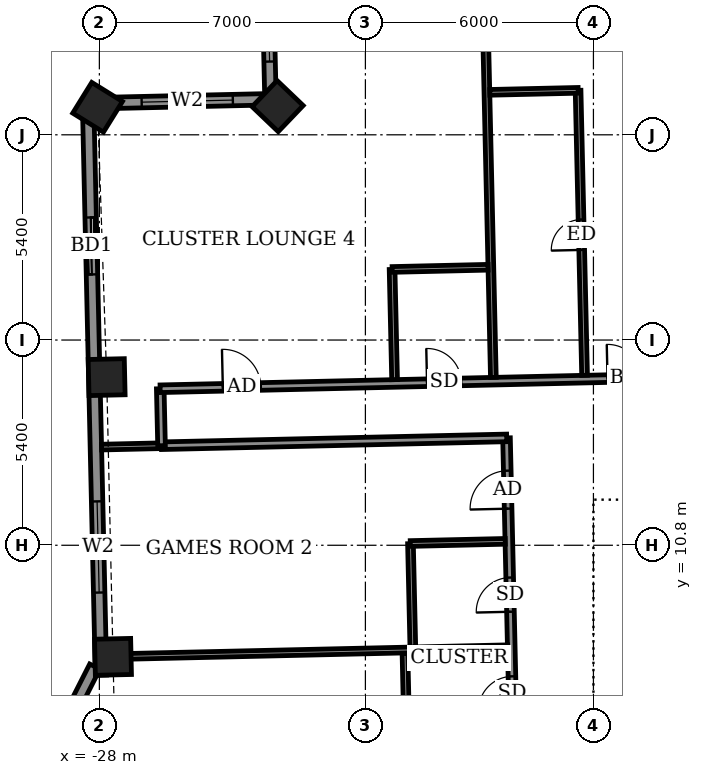
"""IFC4 building model, lengths in metres.
Left out: names, types, materials, properties, quantities, classifications, styles, units other than length and angle.
Written with IfcOpenShell. Run it as: python <this file> out.ifc"""

import sys

from ifc_helpers import new_model, si_unit, direction, frame, frame_2d, origin, origin_2d, place, context, subcontext, project, spatial, rectangle, extrude, element, fill, save


model = new_model("IFC4")
c1 = context("Model", 3, precision=1e-05, world=origin(), true_north=direction((0.0, 1.0)))
c2 = subcontext(c1, "Body", "Model", "MODEL_VIEW")
j1 = project(units=[si_unit("LENGTHUNIT", "METRE"), si_unit("PLANEANGLEUNIT", "RADIAN")], contexts=[c1])
p1 = place(None, origin())
s1 = spatial("IfcSite", under=j1, at=p1, CompositionType="ELEMENT")
p2 = place(p1, origin())
s2 = spatial("IfcBuilding", under=s1, at=p2, CompositionType="ELEMENT")
p3 = place(p2, frame((0.0, 0.0, 279.9)))
s3 = spatial("IfcBuildingStorey", under=s2, at=p3, CompositionType="ELEMENT", Elevation=279.9)
for number, where, z_axis, x_axis in (
    (1, (-23.309, 22.355, -0.55), (0.0, 0.0, 1.0), (-0.691, -0.723, 0.0)),
    (2, (-28.046, 22.324, -0.55), (0.0, 0.0, 1.0), (-0.527, -0.85, 0.0)),
    (3, (-27.808, 15.224, -0.55), (0.0, 0.0, 1.0), (0.023, -1.0, 0.0)),
    (4, (-27.641, 7.864, -0.55), (0.0, 0.0, 1.0), (0.023, -1.0, 0.0)),
):
    element("IfcColumn", number, at=place(p3, frame(where, z_axis=z_axis, x_axis=x_axis)), inside=s3, PredefinedType="COLUMN", context=c2, shape_type="SweptSolid", body=[
        extrude(rectangle(XDim=0.95, YDim=0.95, at=origin_2d()), origin(), (0.0, 0.0, 1.0), 3.6),
    ])
p4 = place(p3, frame((-23.607, 27.335, 0.0), z_axis=(0.0, 0.0, 1.0), x_axis=(0.022683280499, -0.999742701292, 0.0)))
e5 = element("IfcWall", 5, at=p4, inside=s3, PredefinedType="SOLIDWALL", context=c2, shape_type="SweptSolid", body=[
    extrude(rectangle(XDim=4.8, YDim=0.3, at=frame_2d((2.4, 0.0))), origin(), (0.0, 0.0, 1.0), 2.55),
])
p5 = place(p4, frame((1.409, 0.0, 0.9)))
e6 = element("IfcOpeningElement", 6, at=p5, cuts=e5, PredefinedType="OPENING", context=c2, shape_type="SweptSolid", body=[
    extrude(rectangle(XDim=2.4, YDim=1.5, at=frame_2d((1.2, 0.75))), frame((0.0, 0.16, 0.0), z_axis=(0.0, -1.0, 0.0), x_axis=(1.0, 0.0, 0.0)), (0.0, 0.0, 1.0), 0.32),
])
p6 = place(p3, frame((-23.498, 22.536, 0.0), z_axis=(0.0, 0.0, 1.0), x_axis=(-0.999742701292, -0.022683280499, 0.0)))
e7 = element("IfcWall", 7, at=p6, inside=s3, PredefinedType="SOLIDWALL", context=c2, shape_type="SweptSolid", body=[
    extrude(rectangle(XDim=4.8, YDim=0.3, at=frame_2d((2.4, 0.0))), origin(), (0.0, 0.0, 1.0), 2.55),
])
p7 = place(p6, frame((0.99, 0.0, 0.9)))
e8 = element("IfcOpeningElement", 8, at=p7, cuts=e7, PredefinedType="OPENING", context=c2, shape_type="SweptSolid", body=[
    extrude(rectangle(XDim=2.4, YDim=1.5, at=frame_2d((1.2, 0.75))), frame((0.0, 0.16, 0.0), z_axis=(0.0, -1.0, 0.0), x_axis=(1.0, 0.0, 0.0)), (0.0, 0.0, 1.0), 0.32),
])
p8 = place(p3, frame((-28.297, 22.427, 0.0), z_axis=(0.0, 0.0, 1.0), x_axis=(0.022663916124, -0.999743140465, 0.0)))
e9 = element("IfcWall", 9, at=p8, inside=s3, PredefinedType="SOLIDWALL", context=c2, shape_type="SweptSolid", body=[
    extrude(rectangle(XDim=15.049, YDim=0.3, at=frame_2d((7.524, 0.0))), origin(), (0.0, 0.0, 1.0), 2.5),
])
p9 = place(p8, frame((3.002, 0.0, 0.0)))
e10 = element("IfcOpeningElement", 10, at=p9, cuts=e9, PredefinedType="OPENING", context=c2, shape_type="SweptSolid", body=[
    extrude(rectangle(XDim=1.5, YDim=2.4, at=frame_2d((0.75, 1.2))), frame((0.0, 0.16, 0.0), z_axis=(0.0, -1.0, 0.0), x_axis=(1.0, 0.0, 0.0)), (0.0, 0.0, 1.0), 0.32),
])
p10 = place(p8, frame((10.475, 0.0, 0.9)))
e11 = element("IfcOpeningElement", 11, at=p10, cuts=e9, PredefinedType="OPENING", context=c2, shape_type="SweptSolid", body=[
    extrude(rectangle(XDim=2.4, YDim=1.5, at=frame_2d((1.2, 0.75))), frame((0.0, 0.16, 0.0), z_axis=(0.0, -1.0, 0.0), x_axis=(1.0, 0.0, 0.0)), (0.0, 0.0, 1.0), 0.32),
])
p11 = place(p3, frame((-28.12, 7.608, 0.0), z_axis=(0.0, 0.0, 1.0), x_axis=(-0.45266802131, -0.891679125293, 0.0)))
e12 = element("IfcWall", 12, at=p11, inside=s3, PredefinedType="SOLIDWALL", context=c2, shape_type="SweptSolid", body=[
    extrude(rectangle(XDim=5.399, YDim=0.3, at=frame_2d((2.699, 0.0))), origin(), (0.0, 0.0, 1.0), 3.05),
])
p12 = place(p11, frame((2.008, 0.0, 0.9)))
e13 = element("IfcOpeningElement", 13, at=p12, cuts=e12, PredefinedType="OPENING", context=c2, shape_type="SweptSolid", body=[
    extrude(rectangle(XDim=1.2, YDim=1.5, at=frame_2d((0.6, 0.75))), frame((0.0, 0.16, 0.0), z_axis=(0.0, -1.0, 0.0), x_axis=(1.0, 0.0, 0.0)), (0.0, 0.0, 1.0), 0.32),
])
p13 = place(p3, frame((-16.684, -12.919, 0.0), z_axis=(0.0, 0.0, 1.0), x_axis=(-0.022712214871, 0.999742044377, 0.0)))
e14 = element("IfcWall", 14, at=p13, inside=s3, PredefinedType="PARTITIONING", context=c2, shape_type="SweptSolid", body=[
    extrude(rectangle(XDim=26.551, YDim=0.2, at=frame_2d((13.275, 0.0))), origin(), (0.0, 0.0, 1.0), 3.05),
])
p14 = place(p13, frame((24.688, 0.0, 0.0)))
e15 = element("IfcOpeningElement", 15, at=p14, cuts=e14, PredefinedType="OPENING", context=c2, shape_type="SweptSolid", body=[
    extrude(rectangle(XDim=1.0, YDim=2.1, at=frame_2d((0.5, 1.05))), frame((0.0, 0.11, 0.0), z_axis=(0.0, -1.0, 0.0), x_axis=(1.0, 0.0, 0.0)), (0.0, 0.0, 1.0), 0.22),
])
p15 = place(p13, frame((21.975, 0.0, 0.0)))
e16 = element("IfcOpeningElement", 16, at=p15, cuts=e14, PredefinedType="OPENING", context=c2, shape_type="SweptSolid", body=[
    extrude(rectangle(XDim=0.9, YDim=2.1, at=frame_2d((0.45, 1.05))), frame((0.0, 0.11, 0.0), z_axis=(0.0, -1.0, 0.0), x_axis=(1.0, 0.0, 0.0)), (0.0, 0.0, 1.0), 0.22),
])
p16 = place(p13, frame((16.875, 0.0, 0.0)))
e17 = element("IfcOpeningElement", 17, at=p16, cuts=e14, PredefinedType="OPENING", context=c2, shape_type="SweptSolid", body=[
    extrude(rectangle(XDim=1.0, YDim=2.1, at=frame_2d((0.5, 1.05))), frame((0.0, 0.11, 0.0), z_axis=(0.0, -1.0, 0.0), x_axis=(1.0, 0.0, 0.0)), (0.0, 0.0, 1.0), 0.22),
])
p17 = place(p13, frame((19.375, 0.0, 0.0)))
e18 = element("IfcOpeningElement", 18, at=p17, cuts=e14, PredefinedType="OPENING", context=c2, shape_type="SweptSolid", body=[
    extrude(rectangle(XDim=0.9, YDim=2.1, at=frame_2d((0.45, 1.05))), frame((0.0, 0.11, 0.0), z_axis=(0.0, -1.0, 0.0), x_axis=(1.0, 0.0, 0.0)), (0.0, 0.0, 1.0), 0.22),
])
p18 = place(p13, frame((14.05, 0.0, 0.0)))
e19 = element("IfcOpeningElement", 19, at=p18, cuts=e14, PredefinedType="OPENING", context=c2, shape_type="SweptSolid", body=[
    extrude(rectangle(XDim=1.0, YDim=2.1, at=frame_2d((0.5, 1.05))), frame((0.0, 0.11, 0.0), z_axis=(0.0, -1.0, 0.0), x_axis=(1.0, 0.0, 0.0)), (0.0, 0.0, 1.0), 0.22),
])
p19 = place(p13, frame((11.225, 0.0, 0.0)))
e20 = element("IfcOpeningElement", 20, at=p19, cuts=e14, PredefinedType="OPENING", context=c2, shape_type="SweptSolid", body=[
    extrude(rectangle(XDim=0.9, YDim=2.1, at=frame_2d((0.45, 1.05))), frame((0.0, 0.11, 0.0), z_axis=(0.0, -1.0, 0.0), x_axis=(1.0, 0.0, 0.0)), (0.0, 0.0, 1.0), 0.22),
])
p20 = place(p13, frame((8.37, 0.0, 0.0)))
e21 = element("IfcOpeningElement", 21, at=p20, cuts=e14, PredefinedType="OPENING", context=c2, shape_type="SweptSolid", body=[
    extrude(rectangle(XDim=1.0, YDim=2.1, at=frame_2d((0.5, 1.05))), frame((0.0, 0.11, 0.0), z_axis=(0.0, -1.0, 0.0), x_axis=(1.0, 0.0, 0.0)), (0.0, 0.0, 1.0), 0.22),
])
p21 = place(p13, frame((5.263, 0.0, 0.0)))
e22 = element("IfcOpeningElement", 22, at=p21, cuts=e14, PredefinedType="OPENING", context=c2, shape_type="SweptSolid", body=[
    extrude(rectangle(XDim=1.0, YDim=2.1, at=frame_2d((0.5, 1.05))), frame((0.0, 0.11, 0.0), z_axis=(0.0, -1.0, 0.0), x_axis=(1.0, 0.0, 0.0)), (0.0, 0.0, 1.0), 0.22),
])
p22 = place(p13, frame((0.425, 0.0, 0.0)))
e23 = element("IfcOpeningElement", 23, at=p22, cuts=e14, PredefinedType="OPENING", context=c2, shape_type="SweptSolid", body=[
    extrude(rectangle(XDim=1.0, YDim=2.1, at=frame_2d((0.5, 1.05))), frame((0.0, 0.11, 0.0), z_axis=(0.0, -1.0, 0.0), x_axis=(1.0, 0.0, 0.0)), (0.0, 0.0, 1.0), 0.22),
])
p23 = place(p13, frame((2.6, 0.0, 0.0)))
e24 = element("IfcOpeningElement", 24, at=p23, cuts=e14, PredefinedType="OPENING", context=c2, shape_type="SweptSolid", body=[
    extrude(rectangle(XDim=0.9, YDim=2.1, at=frame_2d((0.45, 1.05))), frame((0.0, 0.11, 0.0), z_axis=(0.0, -1.0, 0.0), x_axis=(1.0, 0.0, 0.0)), (0.0, 0.0, 1.0), 0.22),
])
p24 = place(p3, frame((-19.906, 5.638, 0.0), z_axis=(0.0, 0.0, 1.0), x_axis=(-0.022781023197, 0.999740478815, 0.0)))
e25 = element("IfcWall", 25, at=p24, inside=s3, PredefinedType="PARTITIONING", context=c2, shape_type="SweptSolid", body=[
    extrude(rectangle(XDim=2.325, YDim=0.15, at=frame_2d((1.163, 0.0))), origin(), (0.0, 0.0, 1.0), 3.05),
])
p25 = place(p3, frame((-19.752, 8.117, 0.0), z_axis=(0.0, 0.0, 1.0), x_axis=(-0.022749889061, 0.999741187782, 0.0)))
e26 = element("IfcWall", 26, at=p25, inside=s3, PredefinedType="PARTITIONING", context=c2, shape_type="SweptSolid", body=[
    extrude(rectangle(XDim=2.726, YDim=0.15, at=frame_2d((1.363, 0.0))), origin(), (0.0, 0.0, 1.0), 3.05),
])
p26 = place(p3, frame((-27.817, 7.864, 0.0), z_axis=(0.0, 0.0, 1.0), x_axis=(0.9997418952, 0.022718780382, 0.0)))
e27 = element("IfcWall", 27, at=p26, inside=s3, PredefinedType="PARTITIONING", context=c2, shape_type="SweptSolid", body=[
    extrude(rectangle(XDim=10.563, YDim=0.15, at=frame_2d((5.282, 0.0))), origin(), (0.0, 0.0, 1.0), 3.05),
])
p27 = place(p3, frame((-19.819, 10.846, 0.0), z_axis=(0.0, 0.0, 1.0), x_axis=(0.999738801317, 0.022854521249, 0.0)))
e28 = element("IfcWall", 28, at=p27, inside=s3, PredefinedType="PARTITIONING", context=c2, shape_type="SweptSolid", body=[
    extrude(rectangle(XDim=2.5, YDim=0.15, at=frame_2d((1.25, 0.0))), origin(), (0.0, 0.0, 1.0), 3.05),
])
p28 = place(p3, frame((-27.942, 13.383, 0.0), z_axis=(0.0, 0.0, 1.0), x_axis=(0.999741755729, 0.022724916977, 0.0)))
e29 = element("IfcWall", 29, at=p28, inside=s3, PredefinedType="PARTITIONING", context=c2, shape_type="SweptSolid", body=[
    extrude(rectangle(XDim=1.579, YDim=0.15, at=frame_2d((0.79, 0.0))), origin(), (0.0, 0.0, 1.0), 2.5),
])
p29 = place(p3, frame((-26.367, 13.419, 0.0), z_axis=(0.0, 0.0, 1.0), x_axis=(0.999742888587, 0.022675024131, 0.0)))
e30 = element("IfcWall", 30, at=p29, inside=s3, PredefinedType="PARTITIONING", context=c2, shape_type="SweptSolid", body=[
    extrude(rectangle(XDim=9.087, YDim=0.2, at=frame_2d((4.544, 0.0))), origin(), (0.0, 0.0, 1.0), 3.05),
])
p30 = place(p3, frame((-26.364, 13.419, 0.0), z_axis=(0.0, 0.0, 1.0), x_axis=(-0.022632637625, 0.99974384905, 0.0)))
e31 = element("IfcWall", 31, at=p30, inside=s3, PredefinedType="PARTITIONING", context=c2, shape_type="SweptSolid", body=[
    extrude(rectangle(XDim=1.5, YDim=0.2, at=frame_2d((0.75, 0.0))), origin(), (0.0, 0.0, 1.0), 3.05),
])
p31 = place(p3, frame((-26.401, 14.918, 0.0), z_axis=(0.0, 0.0, 1.0), x_axis=(0.99974239733, 0.022696673341, 0.0)))
e32 = element("IfcWall", 32, at=p31, inside=s3, PredefinedType="PARTITIONING", context=c2, shape_type="SweptSolid", body=[
    extrude(rectangle(XDim=55.386, YDim=0.2, at=frame_2d((27.693, 0.0))), origin(), (0.0, 0.0, 1.0), 3.05),
])
p32 = place(p31, frame((52.889, 0.0, 0.0)))
e33 = element("IfcOpeningElement", 33, at=p32, cuts=e32, PredefinedType="OPENING", context=c2, shape_type="SweptSolid", body=[
    extrude(rectangle(XDim=1.0, YDim=2.1, at=frame_2d((0.5, 1.05))), frame((0.0, 0.11, 0.0), z_axis=(0.0, -1.0, 0.0), x_axis=(1.0, 0.0, 0.0)), (0.0, 0.0, 1.0), 0.22),
])
p33 = place(p31, frame((48.6, 0.0, 0.0)))
e34 = element("IfcOpeningElement", 34, at=p33, cuts=e32, PredefinedType="OPENING", context=c2, shape_type="SweptSolid", body=[
    extrude(rectangle(XDim=0.9, YDim=2.1, at=frame_2d((0.45, 1.05))), frame((0.0, 0.11, 0.0), z_axis=(0.0, -1.0, 0.0), x_axis=(1.0, 0.0, 0.0)), (0.0, 0.0, 1.0), 0.22),
])
p34 = place(p31, frame((41.8, 0.0, 0.0)))
e35 = element("IfcOpeningElement", 35, at=p34, cuts=e32, PredefinedType="OPENING", context=c2, shape_type="SweptSolid", body=[
    extrude(rectangle(XDim=0.9, YDim=2.1, at=frame_2d((0.45, 1.05))), frame((0.0, 0.11, 0.0), z_axis=(0.0, -1.0, 0.0), x_axis=(1.0, 0.0, 0.0)), (0.0, 0.0, 1.0), 0.22),
])
p35 = place(p31, frame((39.675, 0.0, 0.0)))
e36 = element("IfcOpeningElement", 36, at=p35, cuts=e32, PredefinedType="OPENING", context=c2, shape_type="SweptSolid", body=[
    extrude(rectangle(XDim=0.9, YDim=2.1, at=frame_2d((0.45, 1.05))), frame((0.0, 0.11, 0.0), z_axis=(0.0, -1.0, 0.0), x_axis=(1.0, 0.0, 0.0)), (0.0, 0.0, 1.0), 0.22),
])
p36 = place(p31, frame((32.675, 0.0, 0.0)))
e37 = element("IfcOpeningElement", 37, at=p36, cuts=e32, PredefinedType="OPENING", context=c2, shape_type="SweptSolid", body=[
    extrude(rectangle(XDim=0.9, YDim=2.1, at=frame_2d((0.45, 1.05))), frame((0.0, 0.11, 0.0), z_axis=(0.0, -1.0, 0.0), x_axis=(1.0, 0.0, 0.0)), (0.0, 0.0, 1.0), 0.22),
])
p37 = place(p31, frame((30.4, 0.0, 0.0)))
e38 = element("IfcOpeningElement", 38, at=p37, cuts=e32, PredefinedType="OPENING", context=c2, shape_type="SweptSolid", body=[
    extrude(rectangle(XDim=0.9, YDim=2.1, at=frame_2d((0.45, 1.05))), frame((0.0, 0.11, 0.0), z_axis=(0.0, -1.0, 0.0), x_axis=(1.0, 0.0, 0.0)), (0.0, 0.0, 1.0), 0.22),
])
p38 = place(p31, frame((23.225, 0.0, 0.0)))
e39 = element("IfcOpeningElement", 39, at=p38, cuts=e32, PredefinedType="OPENING", context=c2, shape_type="SweptSolid", body=[
    extrude(rectangle(XDim=0.9, YDim=2.1, at=frame_2d((0.45, 1.05))), frame((0.0, 0.11, 0.0), z_axis=(0.0, -1.0, 0.0), x_axis=(1.0, 0.0, 0.0)), (0.0, 0.0, 1.0), 0.22),
])
p39 = place(p31, frame((20.9, 0.0, 0.0)))
e40 = element("IfcOpeningElement", 40, at=p39, cuts=e32, PredefinedType="OPENING", context=c2, shape_type="SweptSolid", body=[
    extrude(rectangle(XDim=0.9, YDim=2.1, at=frame_2d((0.45, 1.05))), frame((0.0, 0.11, 0.0), z_axis=(0.0, -1.0, 0.0), x_axis=(1.0, 0.0, 0.0)), (0.0, 0.0, 1.0), 0.22),
])
p40 = place(p31, frame((13.9, 0.0, 0.0)))
e41 = element("IfcOpeningElement", 41, at=p40, cuts=e32, PredefinedType="OPENING", context=c2, shape_type="SweptSolid", body=[
    extrude(rectangle(XDim=0.9, YDim=2.1, at=frame_2d((0.45, 1.05))), frame((0.0, 0.11, 0.0), z_axis=(0.0, -1.0, 0.0), x_axis=(1.0, 0.0, 0.0)), (0.0, 0.0, 1.0), 0.22),
])
p41 = place(p31, frame((11.775, 0.0, 0.0)))
e42 = element("IfcOpeningElement", 42, at=p41, cuts=e32, PredefinedType="OPENING", context=c2, shape_type="SweptSolid", body=[
    extrude(rectangle(XDim=0.9, YDim=2.1, at=frame_2d((0.45, 1.05))), frame((0.0, 0.11, 0.0), z_axis=(0.0, -1.0, 0.0), x_axis=(1.0, 0.0, 0.0)), (0.0, 0.0, 1.0), 0.22),
])
p42 = place(p31, frame((1.65, 0.0, 0.0)))
e43 = element("IfcOpeningElement", 43, at=p42, cuts=e32, PredefinedType="OPENING", context=c2, shape_type="SweptSolid", body=[
    extrude(rectangle(XDim=1.0, YDim=2.1, at=frame_2d((0.5, 1.05))), frame((0.0, 0.11, 0.0), z_axis=(0.0, -1.0, 0.0), x_axis=(1.0, 0.0, 0.0)), (0.0, 0.0, 1.0), 0.22),
])
p43 = place(p31, frame((7.025, 0.0, 0.0)))
e44 = element("IfcOpeningElement", 44, at=p43, cuts=e32, PredefinedType="OPENING", context=c2, shape_type="SweptSolid", body=[
    extrude(rectangle(XDim=0.9, YDim=2.1, at=frame_2d((0.45, 1.05))), frame((0.0, 0.11, 0.0), z_axis=(0.0, -1.0, 0.0), x_axis=(1.0, 0.0, 0.0)), (0.0, 0.0, 1.0), 0.22),
])
p44 = place(p3, frame((-20.232, 15.158, 0.0), z_axis=(0.0, 0.0, 1.0), x_axis=(-0.022817032779, 0.999739657619, 0.0)))
e45 = element("IfcWall", 45, at=p44, inside=s3, PredefinedType="PARTITIONING", context=c2, shape_type="SweptSolid", body=[
    extrude(rectangle(XDim=2.9, YDim=0.15, at=frame_2d((1.45, 0.0))), origin(), (0.0, 0.0, 1.0), 3.05),
])
p45 = place(p3, frame((-17.633, 15.217, 0.0), z_axis=(0.0, 0.0, 1.0), x_axis=(-0.02263844782, 0.9997437175, 0.0)))
e46 = element("IfcWall", 46, at=p45, inside=s3, PredefinedType="PARTITIONING", context=c2, shape_type="SweptSolid", body=[
    extrude(rectangle(XDim=12.1, YDim=0.15, at=frame_2d((6.05, 0.0))), origin(), (0.0, 0.0, 1.0), 2.55),
])
p46 = place(p3, frame((-15.233, 15.272, 0.0), z_axis=(0.0, 0.0, 1.0), x_axis=(-0.022819011082, 0.999739612466, 0.0)))
e47 = element("IfcWall", 47, at=p46, inside=s3, PredefinedType="PARTITIONING", context=c2, shape_type="SweptSolid", body=[
    extrude(rectangle(XDim=7.5, YDim=0.15, at=frame_2d((3.75, 0.0))), origin(), (0.0, 0.0, 1.0), 3.05),
])
p47 = place(p46, frame((3.3, 0.0, 0.0)))
e48 = element("IfcOpeningElement", 48, at=p47, cuts=e47, PredefinedType="OPENING", context=c2, shape_type="SweptSolid", body=[
    extrude(rectangle(XDim=0.8, YDim=2.1, at=frame_2d((0.4, 1.05))), frame((0.0, 0.085, 0.0), z_axis=(0.0, -1.0, 0.0), x_axis=(1.0, 0.0, 0.0)), (0.0, 0.0, 1.0), 0.17),
])
p48 = place(p3, frame((-20.296, 18.057, 0.0), z_axis=(0.0, 0.0, 1.0), x_axis=(0.999735102249, 0.023015762656, 0.0)))
e49 = element("IfcWall", 49, at=p48, inside=s3, PredefinedType="PARTITIONING", context=c2, shape_type="SweptSolid", body=[
    extrude(rectangle(XDim=2.525, YDim=0.15, at=frame_2d((1.262, 0.0))), origin(), (0.0, 0.0, 1.0), 3.05),
])
p49 = place(p3, frame((-17.726, 22.717, 0.0), z_axis=(0.0, 0.0, 1.0), x_axis=(0.999740260747, 0.02279059109, 0.0)))
e50 = element("IfcWall", 50, at=p49, inside=s3, PredefinedType="PARTITIONING", context=c2, shape_type="SweptSolid", body=[
    extrude(rectangle(XDim=2.324, YDim=0.15, at=frame_2d((1.162, 0.0))), origin(), (0.0, 0.0, 1.0), 3.05),
])
p50 = place(p3, frame((-14.5, 11.15, 0.0), z_axis=(0.0, 0.0, 1.0), x_axis=(1.0, 0.0, 0.0)))
e51 = element("IfcWall", 51, at=p50, inside=s3, PredefinedType="SHEAR", context=c2, shape_type="SweptSolid", body=[
    extrude(rectangle(XDim=29.0, YDim=0.7, at=frame_2d((14.5, 0.0))), origin(), (0.0, 0.0, 1.0), 3.6),
])
p51 = place(p3, frame((-14.15, -10.8, 0.0), z_axis=(0.0, 0.0, 1.0), x_axis=(0.0, 1.0, 0.0)))
e52 = element("IfcWall", 52, at=p51, inside=s3, PredefinedType="SHEAR", context=c2, shape_type="SweptSolid", body=[
    extrude(rectangle(XDim=21.6, YDim=0.7, at=frame_2d((10.8, 0.0))), origin(), (0.0, 0.0, 1.0), 3.6),
])
p52 = place(p51, frame((8.25, 0.0, 0.0)))
e53 = element("IfcOpeningElement", 53, at=p52, cuts=e52, PredefinedType="OPENING", context=c2, shape_type="SweptSolid", body=[
    extrude(rectangle(XDim=1.2, YDim=2.1, at=frame_2d((0.6, 1.05))), frame((0.0, 0.36, 0.0), z_axis=(0.0, -1.0, 0.0), x_axis=(1.0, 0.0, 0.0)), (0.0, 0.0, 1.0), 0.72),
])
p53 = place(p51, frame((15.25, 0.0, 0.0)))
e54 = element("IfcOpeningElement", 54, at=p53, cuts=e52, PredefinedType="OPENING", context=c2, shape_type="SweptSolid", body=[
    extrude(rectangle(XDim=1.2, YDim=2.1, at=frame_2d((0.6, 1.05))), frame((0.0, 0.36, 0.0), z_axis=(0.0, -1.0, 0.0), x_axis=(1.0, 0.0, 0.0)), (0.0, 0.0, 1.0), 0.72),
])
p54 = place(p5, origin())
e55 = element("IfcWindow", 55, at=p54, inside=s3, PartitioningType="DOUBLE_PANEL_VERTICAL", PredefinedType="WINDOW", context=c2, shape_type="SweptSolid", body=[
    extrude(rectangle(XDim=2.4, YDim=1.5, at=frame_2d((1.2, 0.75))), frame((0.0, 0.03, 0.0), z_axis=(0.0, -1.0, 0.0), x_axis=(1.0, 0.0, 0.0)), (0.0, 0.0, 1.0), 0.06),
])
fill(e6, e55)
p55 = place(p7, origin())
e56 = element("IfcWindow", 56, at=p55, inside=s3, PartitioningType="DOUBLE_PANEL_VERTICAL", PredefinedType="WINDOW", context=c2, shape_type="SweptSolid", body=[
    extrude(rectangle(XDim=2.4, YDim=1.5, at=frame_2d((1.2, 0.75))), frame((0.0, 0.03, 0.0), z_axis=(0.0, -1.0, 0.0), x_axis=(1.0, 0.0, 0.0)), (0.0, 0.0, 1.0), 0.06),
])
fill(e8, e56)
p56 = place(p9, origin())
e57 = element("IfcDoor", 57, at=p56, inside=s3, OperationType="SLIDING_TO_LEFT", PredefinedType="DOOR", context=c2, shape_type="SweptSolid", body=[
    extrude(rectangle(XDim=1.5, YDim=2.4, at=frame_2d((0.75, 1.2))), frame((0.0, 0.025, 0.0), z_axis=(0.0, -1.0, 0.0), x_axis=(1.0, 0.0, 0.0)), (0.0, 0.0, 1.0), 0.05),
])
fill(e10, e57)
p57 = place(p10, origin())
e58 = element("IfcWindow", 58, at=p57, inside=s3, PartitioningType="DOUBLE_PANEL_VERTICAL", PredefinedType="WINDOW", context=c2, shape_type="SweptSolid", body=[
    extrude(rectangle(XDim=2.4, YDim=1.5, at=frame_2d((1.2, 0.75))), frame((0.0, 0.03, 0.0), z_axis=(0.0, -1.0, 0.0), x_axis=(1.0, 0.0, 0.0)), (0.0, 0.0, 1.0), 0.06),
])
fill(e11, e58)
p58 = place(p41, origin())
e59 = element("IfcDoor", 59, at=p58, inside=s3, OperationType="SINGLE_SWING_RIGHT", PredefinedType="DOOR", context=c2, shape_type="SweptSolid", body=[
    extrude(rectangle(XDim=0.9, YDim=2.1, at=frame_2d((0.45, 1.05))), frame((0.0, 0.025, 0.0), z_axis=(0.0, -1.0, 0.0), x_axis=(1.0, 0.0, 0.0)), (0.0, 0.0, 1.0), 0.05),
])
fill(e42, e59)
p59 = place(p47, origin())
e60 = element("IfcDoor", 60, at=p59, inside=s3, OperationType="SINGLE_SWING_RIGHT", PredefinedType="DOOR", context=c2, shape_type="SweptSolid", body=[
    extrude(rectangle(XDim=0.8, YDim=2.1, at=frame_2d((0.4, 1.05))), frame((0.0, 0.025, 0.0), z_axis=(0.0, -1.0, 0.0), x_axis=(1.0, 0.0, 0.0)), (0.0, 0.0, 1.0), 0.05),
])
fill(e48, e60)
p60 = place(p42, origin())
e61 = element("IfcDoor", 61, at=p60, inside=s3, OperationType="SINGLE_SWING_RIGHT", PredefinedType="DOOR", context=c2, shape_type="SweptSolid", body=[
    extrude(rectangle(XDim=1.0, YDim=2.1, at=frame_2d((0.5, 1.05))), frame((0.0, 0.025, 0.0), z_axis=(0.0, -1.0, 0.0), x_axis=(1.0, 0.0, 0.0)), (0.0, 0.0, 1.0), 0.05),
])
fill(e43, e61)
p61 = place(p43, origin())
e62 = element("IfcDoor", 62, at=p61, inside=s3, OperationType="SINGLE_SWING_LEFT", PredefinedType="DOOR", context=c2, shape_type="SweptSolid", body=[
    extrude(rectangle(XDim=0.9, YDim=2.1, at=frame_2d((0.45, 1.05))), frame((0.0, 0.025, 0.0), z_axis=(0.0, -1.0, 0.0), x_axis=(1.0, 0.0, 0.0)), (0.0, 0.0, 1.0), 0.05),
])
fill(e44, e62)
p62 = place(p14, origin())
e63 = element("IfcDoor", 63, at=p62, inside=s3, OperationType="SINGLE_SWING_LEFT", PredefinedType="DOOR", context=c2, shape_type="SweptSolid", body=[
    extrude(rectangle(XDim=1.0, YDim=2.1, at=frame_2d((0.5, 1.05))), frame((0.0, 0.025, 0.0), z_axis=(0.0, -1.0, 0.0), x_axis=(1.0, 0.0, 0.0)), (0.0, 0.0, 1.0), 0.05),
])
fill(e15, e63)
p63 = place(p15, origin())
e64 = element("IfcDoor", 64, at=p63, inside=s3, OperationType="SINGLE_SWING_RIGHT", PredefinedType="DOOR", context=c2, shape_type="SweptSolid", body=[
    extrude(rectangle(XDim=0.9, YDim=2.1, at=frame_2d((0.45, 1.05))), frame((0.0, 0.025, 0.0), z_axis=(0.0, -1.0, 0.0), x_axis=(1.0, 0.0, 0.0)), (0.0, 0.0, 1.0), 0.05),
])
fill(e16, e64)
p64 = place(p17, origin())
e65 = element("IfcDoor", 65, at=p64, inside=s3, OperationType="SINGLE_SWING_LEFT", PredefinedType="DOOR", context=c2, shape_type="SweptSolid", body=[
    extrude(rectangle(XDim=0.9, YDim=2.1, at=frame_2d((0.45, 1.05))), frame((0.0, 0.025, 0.0), z_axis=(0.0, -1.0, 0.0), x_axis=(1.0, 0.0, 0.0)), (0.0, 0.0, 1.0), 0.05),
])
fill(e18, e65)
save(model, sys.argv[1])
